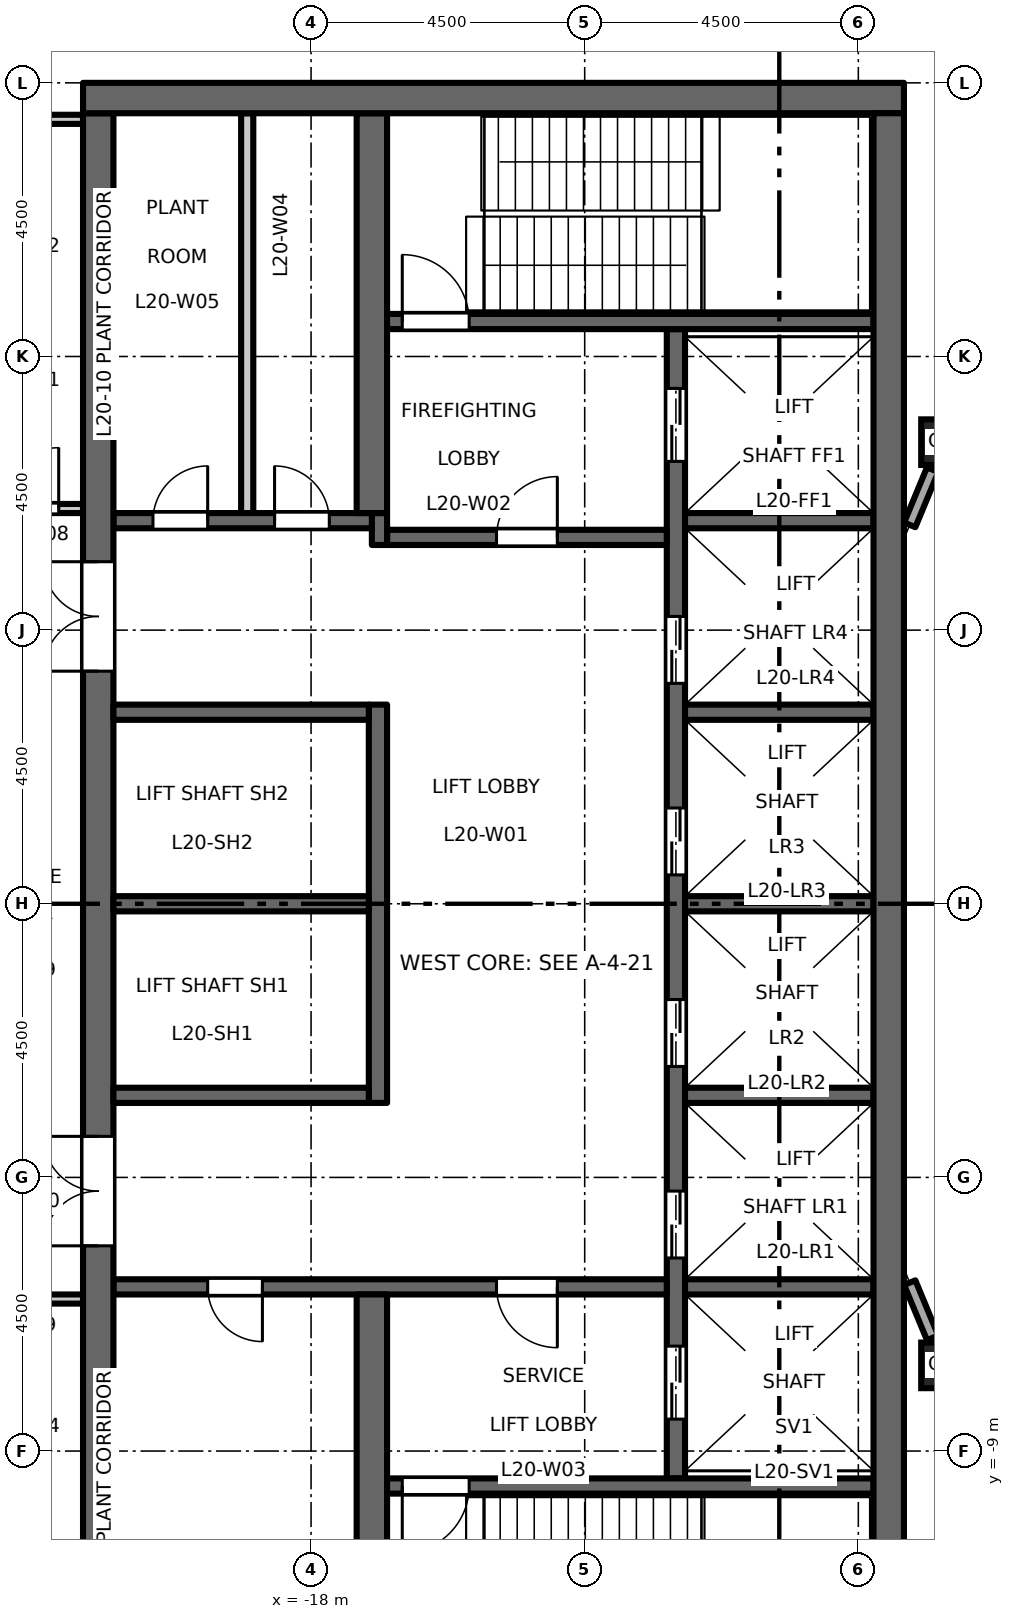
"""IFC4 building model, lengths in metres.
Left out: names, types, materials, properties, quantities, classifications, styles, units other than length and angle.
Written with IfcOpenShell. Run it as: python <this file> out.ifc"""

import sys

from ifc_helpers import new_model, si_unit, direction, frame, frame_2d, origin, origin_2d, place, context, subcontext, project, spatial, rectangle, hollow_rectangle, extrude, element, fill, save


model = new_model("IFC4")
c1 = context("Model", 3, precision=1e-05, world=origin(), true_north=direction((0.0, 1.0)))
c2 = subcontext(c1, "Body", "Model", "MODEL_VIEW")
j1 = project(units=[si_unit("LENGTHUNIT", "METRE"), si_unit("PLANEANGLEUNIT", "RADIAN")], contexts=[c1])
p1 = place(None, origin())
s1 = spatial("IfcSite", under=j1, at=p1, CompositionType="ELEMENT")
p2 = place(p1, origin())
s2 = spatial("IfcBuilding", under=s1, at=p2, CompositionType="ELEMENT")
p3 = place(p2, frame((0.0, 0.0, 94.2)))
s3 = spatial("IfcBuildingStorey", under=s2, at=p3, CompositionType="ELEMENT", Elevation=94.2)
for number, where, z_axis, x_axis in (
    (1, (-7.591, -7.591, 0.0), (0.0, 0.0, 1.0), (1.0, 0.0, 0.0)),
    (2, (-7.591, 7.591, 0.0), (0.0, 0.0, 1.0), (1.0, 0.0, 0.0)),
):
    element("IfcColumn", number, at=place(p3, frame(where, z_axis=z_axis, x_axis=x_axis)), inside=s3, PredefinedType="COLUMN", context=c2, shape_type="SweptSolid", body=[
        extrude(hollow_rectangle(XDim=0.75, YDim=0.75, WallThickness=0.045, at=origin_2d()), origin(), (0.0, 0.0, 1.0), 5.0),
    ])
p4 = place(p3, frame((-12.0, -9.45, 0.0), z_axis=(0.0, 0.0, 1.0), x_axis=(0.0, 1.0, 0.0)))
e3 = element("IfcWall", 3, at=p4, inside=s3, PredefinedType="SHEAR", context=c2, shape_type="SweptSolid", body=[
    extrude(rectangle(XDim=18.9, YDim=0.3, at=frame_2d((9.45, 0.0))), origin(), (0.0, 0.0, 1.0), 4.8),
])
p5 = place(p4, frame((3.625, 0.0, 0.0)))
e4 = element("IfcOpeningElement", 4, at=p5, cuts=e3, PredefinedType="OPENING", context=c2, shape_type="SweptSolid", body=[
    extrude(rectangle(XDim=1.1, YDim=2.1, at=frame_2d((0.55, 1.05))), frame((0.0, 0.16, 0.0), z_axis=(0.0, -1.0, 0.0), x_axis=(1.0, 0.0, 0.0)), (0.0, 0.0, 1.0), 0.32),
])
p6 = place(p4, frame((6.775, 0.0, 0.0)))
e5 = element("IfcOpeningElement", 5, at=p6, cuts=e3, PredefinedType="OPENING", context=c2, shape_type="SweptSolid", body=[
    extrude(rectangle(XDim=1.1, YDim=2.1, at=frame_2d((0.55, 1.05))), frame((0.0, 0.16, 0.0), z_axis=(0.0, -1.0, 0.0), x_axis=(1.0, 0.0, 0.0)), (0.0, 0.0, 1.0), 0.32),
])
p7 = place(p4, frame((9.925, 0.0, 0.0)))
e6 = element("IfcOpeningElement", 6, at=p7, cuts=e3, PredefinedType="OPENING", context=c2, shape_type="SweptSolid", body=[
    extrude(rectangle(XDim=1.1, YDim=2.1, at=frame_2d((0.55, 1.05))), frame((0.0, 0.16, 0.0), z_axis=(0.0, -1.0, 0.0), x_axis=(1.0, 0.0, 0.0)), (0.0, 0.0, 1.0), 0.32),
])
p8 = place(p4, frame((13.075, 0.0, 0.0)))
e7 = element("IfcOpeningElement", 7, at=p8, cuts=e3, PredefinedType="OPENING", context=c2, shape_type="SweptSolid", body=[
    extrude(rectangle(XDim=1.1, YDim=2.1, at=frame_2d((0.55, 1.05))), frame((0.0, 0.16, 0.0), z_axis=(0.0, -1.0, 0.0), x_axis=(1.0, 0.0, 0.0)), (0.0, 0.0, 1.0), 0.32),
])
p9 = place(p4, frame((16.725, 0.0, 0.0)))
e8 = element("IfcOpeningElement", 8, at=p9, cuts=e3, PredefinedType="OPENING", context=c2, shape_type="SweptSolid", body=[
    extrude(rectangle(XDim=1.2, YDim=2.1, at=frame_2d((0.6, 1.05))), frame((0.0, 0.16, 0.0), z_axis=(0.0, -1.0, 0.0), x_axis=(1.0, 0.0, 0.0)), (0.0, 0.0, 1.0), 0.32),
])
p10 = place(p4, frame((0.975, 0.0, 0.0)))
e9 = element("IfcOpeningElement", 9, at=p10, cuts=e3, PredefinedType="OPENING", context=c2, shape_type="SweptSolid", body=[
    extrude(rectangle(XDim=1.2, YDim=2.1, at=frame_2d((0.6, 1.05))), frame((0.0, 0.16, 0.0), z_axis=(0.0, -1.0, 0.0), x_axis=(1.0, 0.0, 0.0)), (0.0, 0.0, 1.0), 0.32),
])
p11 = place(p3, frame((-12.15, 6.025, 0.0), z_axis=(0.0, 0.0, 1.0), x_axis=(-1.0, 0.0, 0.0)))
e10 = element("IfcWall", 10, at=p11, inside=s3, PredefinedType="SHEAR", context=c2, shape_type="SweptSolid", body=[
    extrude(rectangle(XDim=4.6, YDim=0.25, at=frame_2d((2.3, 0.0))), origin(), (0.0, 0.0, 1.0), 4.8),
])
p12 = place(p11, frame((1.8, 0.0, 0.0)))
e11 = element("IfcOpeningElement", 11, at=p12, cuts=e10, PredefinedType="OPENING", context=c2, shape_type="SweptSolid", body=[
    extrude(rectangle(XDim=1.0, YDim=2.1, at=frame_2d((0.5, 1.05))), frame((0.0, 0.135, 0.0), z_axis=(0.0, -1.0, 0.0), x_axis=(1.0, 0.0, 0.0)), (0.0, 0.0, 1.0), 0.27),
])
p13 = place(p3, frame((-16.875, 5.9, 0.0), z_axis=(0.0, 0.0, 1.0), x_axis=(0.0, 1.0, 0.0)))
e12 = element("IfcWall", 12, at=p13, inside=s3, PredefinedType="SHEAR", context=c2, shape_type="SweptSolid", body=[
    extrude(rectangle(XDim=0.525, YDim=0.25, at=frame_2d((0.263, 0.0))), origin(), (0.0, 0.0, 1.0), 4.8),
])
p14 = place(p3, frame((-17.0, 6.3, 0.0), z_axis=(0.0, 0.0, 1.0), x_axis=(-1.0, 0.0, 0.0)))
e13 = element("IfcWall", 13, at=p14, inside=s3, PredefinedType="SHEAR", context=c2, shape_type="SweptSolid", body=[
    extrude(rectangle(XDim=4.25, YDim=0.25, at=frame_2d((2.125, 0.0))), origin(), (0.0, 0.0, 1.0), 4.8),
])
p15 = place(p14, frame((0.7, 0.0, 0.0)))
e14 = element("IfcOpeningElement", 14, at=p15, cuts=e13, PredefinedType="OPENING", context=c2, shape_type="SweptSolid", body=[
    extrude(rectangle(XDim=0.9, YDim=2.1, at=frame_2d((0.45, 1.05))), frame((0.0, 0.135, 0.0), z_axis=(0.0, -1.0, 0.0), x_axis=(1.0, 0.0, 0.0)), (0.0, 0.0, 1.0), 0.27),
])
p16 = place(p14, frame((2.7, 0.0, 0.0)))
e15 = element("IfcOpeningElement", 15, at=p16, cuts=e13, PredefinedType="OPENING", context=c2, shape_type="SweptSolid", body=[
    extrude(rectangle(XDim=0.9, YDim=2.1, at=frame_2d((0.45, 1.05))), frame((0.0, 0.135, 0.0), z_axis=(0.0, -1.0, 0.0), x_axis=(1.0, 0.0, 0.0)), (0.0, 0.0, 1.0), 0.27),
])
p17 = place(p3, frame((-12.15, -6.3, 0.0), z_axis=(0.0, 0.0, 1.0), x_axis=(-1.0, 0.0, 0.0)))
e16 = element("IfcWall", 16, at=p17, inside=s3, PredefinedType="SHEAR", context=c2, shape_type="SweptSolid", body=[
    extrude(rectangle(XDim=9.1, YDim=0.25, at=frame_2d((4.55, 0.0))), origin(), (0.0, 0.0, 1.0), 4.8),
])
p18 = place(p17, frame((1.8, 0.0, 0.0)))
e17 = element("IfcOpeningElement", 17, at=p18, cuts=e16, PredefinedType="OPENING", context=c2, shape_type="SweptSolid", body=[
    extrude(rectangle(XDim=1.0, YDim=2.1, at=frame_2d((0.5, 1.05))), frame((0.0, 0.135, 0.0), z_axis=(0.0, -1.0, 0.0), x_axis=(1.0, 0.0, 0.0)), (0.0, 0.0, 1.0), 0.27),
])
p19 = place(p17, frame((6.65, 0.0, 0.0)))
e18 = element("IfcOpeningElement", 18, at=p19, cuts=e16, PredefinedType="OPENING", context=c2, shape_type="SweptSolid", body=[
    extrude(rectangle(XDim=0.9, YDim=2.1, at=frame_2d((0.45, 1.05))), frame((0.0, 0.135, 0.0), z_axis=(0.0, -1.0, 0.0), x_axis=(1.0, 0.0, 0.0)), (0.0, 0.0, 1.0), 0.27),
])
p20 = place(p3, frame((-21.5, -13.0, 0.0), z_axis=(0.0, 0.0, 1.0), x_axis=(0.0, 1.0, 0.0)))
e19 = element("IfcWall", 19, at=p20, inside=s3, PredefinedType="SHEAR", context=c2, shape_type="SweptSolid", body=[
    extrude(rectangle(XDim=26.0, YDim=0.5, at=frame_2d((13.0, 0.0))), origin(), (0.0, 0.0, 1.0), 4.8),
])
p21 = place(p20, frame((16.825, 0.0, 0.0)))
e20 = element("IfcOpeningElement", 20, at=p21, cuts=e19, PredefinedType="OPENING", context=c2, shape_type="SweptSolid", body=[
    extrude(rectangle(XDim=1.8, YDim=2.1, at=frame_2d((0.9, 1.05))), frame((0.0, 0.26, 0.0), z_axis=(0.0, -1.0, 0.0), x_axis=(1.0, 0.0, 0.0)), (0.0, 0.0, 1.0), 0.52),
])
p22 = place(p20, frame((7.375, 0.0, 0.0)))
e21 = element("IfcOpeningElement", 21, at=p22, cuts=e19, PredefinedType="OPENING", context=c2, shape_type="SweptSolid", body=[
    extrude(rectangle(XDim=1.8, YDim=2.1, at=frame_2d((0.9, 1.05))), frame((0.0, 0.26, 0.0), z_axis=(0.0, -1.0, 0.0), x_axis=(1.0, 0.0, 0.0)), (0.0, 0.0, 1.0), 0.52),
])
p23 = place(p3, frame((-19.05, 6.425, 0.0), z_axis=(0.0, 0.0, 1.0), x_axis=(0.0, 1.0, 0.0)))
e22 = element("IfcWall", 22, at=p23, inside=s3, PredefinedType="PARTITIONING", context=c2, shape_type="SweptSolid", body=[
    extrude(rectangle(XDim=6.575, YDim=0.2, at=frame_2d((3.288, 0.0))), origin(), (0.0, 0.0, 1.0), 4.8),
])
p24 = place(p3, frame((-16.9, -3.275, 0.0), z_axis=(0.0, 0.0, 1.0), x_axis=(0.0, 1.0, 0.0)))
e23 = element("IfcWall", 23, at=p24, inside=s3, PredefinedType="SHEAR", context=c2, shape_type="SweptSolid", body=[
    extrude(rectangle(XDim=6.55, YDim=0.3, at=frame_2d((3.275, 0.0))), origin(), (0.0, 0.0, 1.0), 4.8),
])
for number, where, z_axis, x_axis in (
    (24, (-17.05, 0.0, 0.0), (0.0, 0.0, 1.0), (-1.0, 0.0, 0.0)),
    (25, (-17.05, 3.15, 0.0), (0.0, 0.0, 1.0), (-1.0, 0.0, 0.0)),
    (26, (-17.05, -3.15, 0.0), (0.0, 0.0, 1.0), (-1.0, 0.0, 0.0)),
):
    element("IfcWall", number, at=place(p3, frame(where, z_axis=z_axis, x_axis=x_axis)), inside=s3, PredefinedType="SHEAR", context=c2, shape_type="SweptSolid", body=[
        extrude(rectangle(XDim=4.2, YDim=0.25, at=frame_2d((2.1, 0.0))), origin(), (0.0, 0.0, 1.0), 4.8),
    ])
for number, where, z_axis, x_axis in (
    (27, (-17.0, 6.425, 0.0), (0.0, 0.0, 1.0), (0.0, 1.0, 0.0)),
    (28, (-17.0, -13.0, 0.0), (0.0, 0.0, 1.0), (0.0, 1.0, 0.0)),
):
    element("IfcWall", number, at=place(p3, frame(where, z_axis=z_axis, x_axis=x_axis)), inside=s3, PredefinedType="SHEAR", context=c2, shape_type="SweptSolid", body=[
        extrude(rectangle(XDim=6.575, YDim=0.5, at=frame_2d((3.288, 0.0))), origin(), (0.0, 0.0, 1.0), 4.8),
    ])
for number, where, z_axis, x_axis in (
    (29, (-8.75, 0.0, 0.0), (0.0, 0.0, 1.0), (-1.0, 0.0, 0.0)),
    (30, (-8.75, 3.15, 0.0), (0.0, 0.0, 1.0), (-1.0, 0.0, 0.0)),
    (31, (-8.75, 6.3, 0.0), (0.0, 0.0, 1.0), (-1.0, 0.0, 0.0)),
    (32, (-8.75, -3.15, 0.0), (0.0, 0.0, 1.0), (-1.0, 0.0, 0.0)),
    (33, (-8.75, -6.3, 0.0), (0.0, 0.0, 1.0), (-1.0, 0.0, 0.0)),
):
    element("IfcWall", number, at=place(p3, frame(where, z_axis=z_axis, x_axis=x_axis)), inside=s3, PredefinedType="SHEAR", context=c2, shape_type="SweptSolid", body=[
        extrude(rectangle(XDim=3.1, YDim=0.25, at=frame_2d((1.55, 0.0))), origin(), (0.0, 0.0, 1.0), 4.8),
    ])
p25 = place(p3, frame((-8.75, 9.575, 0.0), z_axis=(0.0, 0.0, 1.0), x_axis=(-1.0, 0.0, 0.0)))
e34 = element("IfcWall", 34, at=p25, inside=s3, PredefinedType="SHEAR", context=c2, shape_type="SweptSolid", body=[
    extrude(rectangle(XDim=8.0, YDim=0.25, at=frame_2d((4.0, 0.0))), origin(), (0.0, 0.0, 1.0), 4.8),
])
p26 = place(p25, frame((6.65, 0.0, 0.0)))
e35 = element("IfcOpeningElement", 35, at=p26, cuts=e34, PredefinedType="OPENING", context=c2, shape_type="SweptSolid", body=[
    extrude(rectangle(XDim=1.1, YDim=2.1, at=frame_2d((0.55, 1.05))), frame((0.0, 0.135, 0.0), z_axis=(0.0, -1.0, 0.0), x_axis=(1.0, 0.0, 0.0)), (0.0, 0.0, 1.0), 0.27),
])
p27 = place(p3, frame((-8.75, -9.575, 0.0), z_axis=(0.0, 0.0, 1.0), x_axis=(-1.0, 0.0, 0.0)))
e36 = element("IfcWall", 36, at=p27, inside=s3, PredefinedType="SHEAR", context=c2, shape_type="SweptSolid", body=[
    extrude(rectangle(XDim=8.0, YDim=0.25, at=frame_2d((4.0, 0.0))), origin(), (0.0, 0.0, 1.0), 4.8),
])
p28 = place(p27, frame((6.65, 0.0, 0.0)))
e37 = element("IfcOpeningElement", 37, at=p28, cuts=e36, PredefinedType="OPENING", context=c2, shape_type="SweptSolid", body=[
    extrude(rectangle(XDim=1.1, YDim=2.1, at=frame_2d((0.55, 1.05))), frame((0.0, 0.135, 0.0), z_axis=(0.0, -1.0, 0.0), x_axis=(1.0, 0.0, 0.0)), (0.0, 0.0, 1.0), 0.27),
])
p29 = place(p3, frame((-8.25, 13.25, 0.0), z_axis=(0.0, 0.0, 1.0), x_axis=(-1.0, 0.0, 0.0)))
e38 = element("IfcWall", 38, at=p29, inside=s3, PredefinedType="SHEAR", context=c2, shape_type="SweptSolid", body=[
    extrude(rectangle(XDim=13.5, YDim=0.5, at=frame_2d((6.75, 0.0))), origin(), (0.0, 0.0, 1.0), 4.8),
])
p30 = place(p3, frame((-8.5, -13.0, 0.0), z_axis=(0.0, 0.0, 1.0), x_axis=(0.0, 1.0, 0.0)))
e39 = element("IfcWall", 39, at=p30, inside=s3, PredefinedType="SHEAR", context=c2, shape_type="SweptSolid", body=[
    extrude(rectangle(XDim=26.0, YDim=0.5, at=frame_2d((13.0, 0.0))), origin(), (0.0, 0.0, 1.0), 4.8),
])
for number, where, z_axis, x_axis in (
    (40, (-7.779, 7.138, 0.0), (0.0, 0.0, 1.0), (-0.383, -0.924, 0.0)),
    (41, (-8.154, -6.231, 0.0), (0.0, 0.0, 1.0), (0.383, -0.924, 0.0)),
):
    element("IfcWall", number, at=place(p3, frame(where, z_axis=z_axis, x_axis=x_axis)), inside=s3, PredefinedType="STANDARD", context=c2, shape_type="SweptSolid", body=[
        extrude(rectangle(XDim=0.982, YDim=0.2, at=frame_2d((0.491, 0.0))), origin(), (0.0, 0.0, 1.0), 4.276),
    ])
p31 = place(p3, frame((-28.575, -6.5, 0.0), z_axis=(0.0, 0.0, 1.0), x_axis=(1.0, 0.0, 0.0)))
e42 = element("IfcWall", 42, at=p31, inside=s3, PredefinedType="PARTITIONING", context=c2, shape_type="SweptSolid", body=[
    extrude(rectangle(XDim=6.825, YDim=0.15, at=frame_2d((3.413, 0.0))), origin(), (0.0, 0.0, 1.0), 4.8),
])
p32 = place(p31, frame((5.225, 0.0, 0.0)))
e43 = element("IfcOpeningElement", 43, at=p32, cuts=e42, PredefinedType="OPENING", context=c2, shape_type="SweptSolid", body=[
    extrude(rectangle(XDim=1.0, YDim=2.1, at=frame_2d((0.5, 1.05))), frame((0.0, 0.085, 0.0), z_axis=(0.0, -1.0, 0.0), x_axis=(1.0, 0.0, 0.0)), (0.0, 0.0, 1.0), 0.17),
])
p33 = place(p3, frame((-28.575, 6.5, 0.0), z_axis=(0.0, 0.0, 1.0), x_axis=(1.0, 0.0, 0.0)))
e44 = element("IfcWall", 44, at=p33, inside=s3, PredefinedType="PARTITIONING", context=c2, shape_type="SweptSolid", body=[
    extrude(rectangle(XDim=6.825, YDim=0.15, at=frame_2d((3.413, 0.0))), origin(), (0.0, 0.0, 1.0), 4.8),
])
p34 = place(p33, frame((5.425, 0.0, 0.0)))
e45 = element("IfcOpeningElement", 45, at=p34, cuts=e44, PredefinedType="OPENING", context=c2, shape_type="SweptSolid", body=[
    extrude(rectangle(XDim=1.0, YDim=2.1, at=frame_2d((0.5, 1.05))), frame((0.0, 0.085, 0.0), z_axis=(0.0, -1.0, 0.0), x_axis=(1.0, 0.0, 0.0)), (0.0, 0.0, 1.0), 0.17),
])
p35 = place(p3, frame((-28.725, 12.9, 0.0), z_axis=(0.0, 0.0, 1.0), x_axis=(1.0, 0.0, 0.0)))
e46 = element("IfcWall", 46, at=p35, inside=s3, PredefinedType="PARTITIONING", context=c2, shape_type="SweptSolid", body=[
    extrude(rectangle(XDim=6.975, YDim=0.15, at=frame_2d((3.488, 0.0))), origin(), (0.0, 0.0, 1.0), 4.8),
])
p36 = place(p12, origin())
e47 = element("IfcDoor", 47, at=p36, inside=s3, OperationType="SINGLE_SWING_LEFT", PredefinedType="DOOR", context=c2, shape_type="SweptSolid", body=[
    extrude(rectangle(XDim=1.0, YDim=2.1, at=frame_2d((0.5, 1.05))), frame((0.0, 0.025, 0.0), z_axis=(0.0, -1.0, 0.0), x_axis=(1.0, 0.0, 0.0)), (0.0, 0.0, 1.0), 0.05),
])
fill(e11, e47)
p37 = place(p18, origin())
e48 = element("IfcDoor", 48, at=p37, inside=s3, OperationType="SINGLE_SWING_RIGHT", PredefinedType="DOOR", context=c2, shape_type="SweptSolid", body=[
    extrude(rectangle(XDim=1.0, YDim=2.1, at=frame_2d((0.5, 1.05))), frame((0.0, 0.025, 0.0), z_axis=(0.0, -1.0, 0.0), x_axis=(1.0, 0.0, 0.0)), (0.0, 0.0, 1.0), 0.05),
])
fill(e17, e48)
p38 = place(p26, origin())
e49 = element("IfcDoor", 49, at=p38, inside=s3, OperationType="SINGLE_SWING_RIGHT", PredefinedType="DOOR", context=c2, shape_type="SweptSolid", body=[
    extrude(rectangle(XDim=1.1, YDim=2.1, at=frame_2d((0.55, 1.05))), frame((0.0, 0.025, 0.0), z_axis=(0.0, -1.0, 0.0), x_axis=(1.0, 0.0, 0.0)), (0.0, 0.0, 1.0), 0.05),
])
fill(e35, e49)
p39 = place(p28, origin())
e50 = element("IfcDoor", 50, at=p39, inside=s3, OperationType="SINGLE_SWING_LEFT", PredefinedType="DOOR", context=c2, shape_type="SweptSolid", body=[
    extrude(rectangle(XDim=1.1, YDim=2.1, at=frame_2d((0.55, 1.05))), frame((0.0, 0.025, 0.0), z_axis=(0.0, -1.0, 0.0), x_axis=(1.0, 0.0, 0.0)), (0.0, 0.0, 1.0), 0.05),
])
fill(e37, e50)
p40 = place(p21, origin())
e51 = element("IfcDoor", 51, at=p40, inside=s3, OperationType="DOUBLE_DOOR_DOUBLE_SWING", PredefinedType="DOOR", context=c2, shape_type="SweptSolid", body=[
    extrude(rectangle(XDim=1.8, YDim=2.1, at=frame_2d((0.9, 1.05))), frame((0.0, 0.025, 0.0), z_axis=(0.0, -1.0, 0.0), x_axis=(1.0, 0.0, 0.0)), (0.0, 0.0, 1.0), 0.05),
])
fill(e20, e51)
p41 = place(p22, origin())
e52 = element("IfcDoor", 52, at=p41, inside=s3, OperationType="DOUBLE_DOOR_DOUBLE_SWING", PredefinedType="DOOR", context=c2, shape_type="SweptSolid", body=[
    extrude(rectangle(XDim=1.8, YDim=2.1, at=frame_2d((0.9, 1.05))), frame((0.0, 0.025, 0.0), z_axis=(0.0, -1.0, 0.0), x_axis=(1.0, 0.0, 0.0)), (0.0, 0.0, 1.0), 0.05),
])
fill(e21, e52)
p42 = place(p5, origin())
e53 = element("IfcDoor", 53, at=p42, inside=s3, OperationType="DOUBLE_DOOR_SLIDING", PredefinedType="DOOR", context=c2, shape_type="SweptSolid", body=[
    extrude(rectangle(XDim=1.1, YDim=2.1, at=frame_2d((0.55, 1.05))), frame((0.0, 0.025, 0.0), z_axis=(0.0, -1.0, 0.0), x_axis=(1.0, 0.0, 0.0)), (0.0, 0.0, 1.0), 0.05),
])
fill(e4, e53)
p43 = place(p6, origin())
e54 = element("IfcDoor", 54, at=p43, inside=s3, OperationType="DOUBLE_DOOR_SLIDING", PredefinedType="DOOR", context=c2, shape_type="SweptSolid", body=[
    extrude(rectangle(XDim=1.1, YDim=2.1, at=frame_2d((0.55, 1.05))), frame((0.0, 0.025, 0.0), z_axis=(0.0, -1.0, 0.0), x_axis=(1.0, 0.0, 0.0)), (0.0, 0.0, 1.0), 0.05),
])
fill(e5, e54)
p44 = place(p7, origin())
e55 = element("IfcDoor", 55, at=p44, inside=s3, OperationType="DOUBLE_DOOR_SLIDING", PredefinedType="DOOR", context=c2, shape_type="SweptSolid", body=[
    extrude(rectangle(XDim=1.1, YDim=2.1, at=frame_2d((0.55, 1.05))), frame((0.0, 0.025, 0.0), z_axis=(0.0, -1.0, 0.0), x_axis=(1.0, 0.0, 0.0)), (0.0, 0.0, 1.0), 0.05),
])
fill(e6, e55)
p45 = place(p8, origin())
e56 = element("IfcDoor", 56, at=p45, inside=s3, OperationType="DOUBLE_DOOR_SLIDING", PredefinedType="DOOR", context=c2, shape_type="SweptSolid", body=[
    extrude(rectangle(XDim=1.1, YDim=2.1, at=frame_2d((0.55, 1.05))), frame((0.0, 0.025, 0.0), z_axis=(0.0, -1.0, 0.0), x_axis=(1.0, 0.0, 0.0)), (0.0, 0.0, 1.0), 0.05),
])
fill(e7, e56)
p46 = place(p9, origin())
e57 = element("IfcDoor", 57, at=p46, inside=s3, OperationType="DOUBLE_DOOR_SLIDING", PredefinedType="DOOR", context=c2, shape_type="SweptSolid", body=[
    extrude(rectangle(XDim=1.2, YDim=2.1, at=frame_2d((0.6, 1.05))), frame((0.0, 0.025, 0.0), z_axis=(0.0, -1.0, 0.0), x_axis=(1.0, 0.0, 0.0)), (0.0, 0.0, 1.0), 0.05),
])
fill(e8, e57)
p47 = place(p10, origin())
e58 = element("IfcDoor", 58, at=p47, inside=s3, OperationType="DOUBLE_DOOR_SLIDING", PredefinedType="DOOR", context=c2, shape_type="SweptSolid", body=[
    extrude(rectangle(XDim=1.2, YDim=2.1, at=frame_2d((0.6, 1.05))), frame((0.0, 0.025, 0.0), z_axis=(0.0, -1.0, 0.0), x_axis=(1.0, 0.0, 0.0)), (0.0, 0.0, 1.0), 0.05),
])
fill(e9, e58)
p48 = place(p15, origin())
e59 = element("IfcDoor", 59, at=p48, inside=s3, OperationType="SINGLE_SWING_RIGHT", PredefinedType="DOOR", context=c2, shape_type="SweptSolid", body=[
    extrude(rectangle(XDim=0.9, YDim=2.1, at=frame_2d((0.45, 1.05))), frame((0.0, 0.025, 0.0), z_axis=(0.0, -1.0, 0.0), x_axis=(1.0, 0.0, 0.0)), (0.0, 0.0, 1.0), 0.05),
])
fill(e14, e59)
p49 = place(p16, origin())
e60 = element("IfcDoor", 60, at=p49, inside=s3, OperationType="SINGLE_SWING_LEFT", PredefinedType="DOOR", context=c2, shape_type="SweptSolid", body=[
    extrude(rectangle(XDim=0.9, YDim=2.1, at=frame_2d((0.45, 1.05))), frame((0.0, 0.025, 0.0), z_axis=(0.0, -1.0, 0.0), x_axis=(1.0, 0.0, 0.0)), (0.0, 0.0, 1.0), 0.05),
])
fill(e15, e60)
p50 = place(p19, origin())
e61 = element("IfcDoor", 61, at=p50, inside=s3, OperationType="SINGLE_SWING_RIGHT", PredefinedType="DOOR", context=c2, shape_type="SweptSolid", body=[
    extrude(rectangle(XDim=0.9, YDim=2.1, at=frame_2d((0.45, 1.05))), frame((0.0, 0.025, 0.0), z_axis=(0.0, -1.0, 0.0), x_axis=(1.0, 0.0, 0.0)), (0.0, 0.0, 1.0), 0.05),
])
fill(e18, e61)
p51 = place(p34, origin())
e62 = element("IfcDoor", 62, at=p51, inside=s3, OperationType="SINGLE_SWING_RIGHT", PredefinedType="DOOR", context=c2, shape_type="SweptSolid", body=[
    extrude(rectangle(XDim=1.0, YDim=2.1, at=frame_2d((0.5, 1.05))), frame((0.0, 0.025, 0.0), z_axis=(0.0, -1.0, 0.0), x_axis=(1.0, 0.0, 0.0)), (0.0, 0.0, 1.0), 0.05),
])
fill(e45, e62)
save(model, sys.argv[1])
